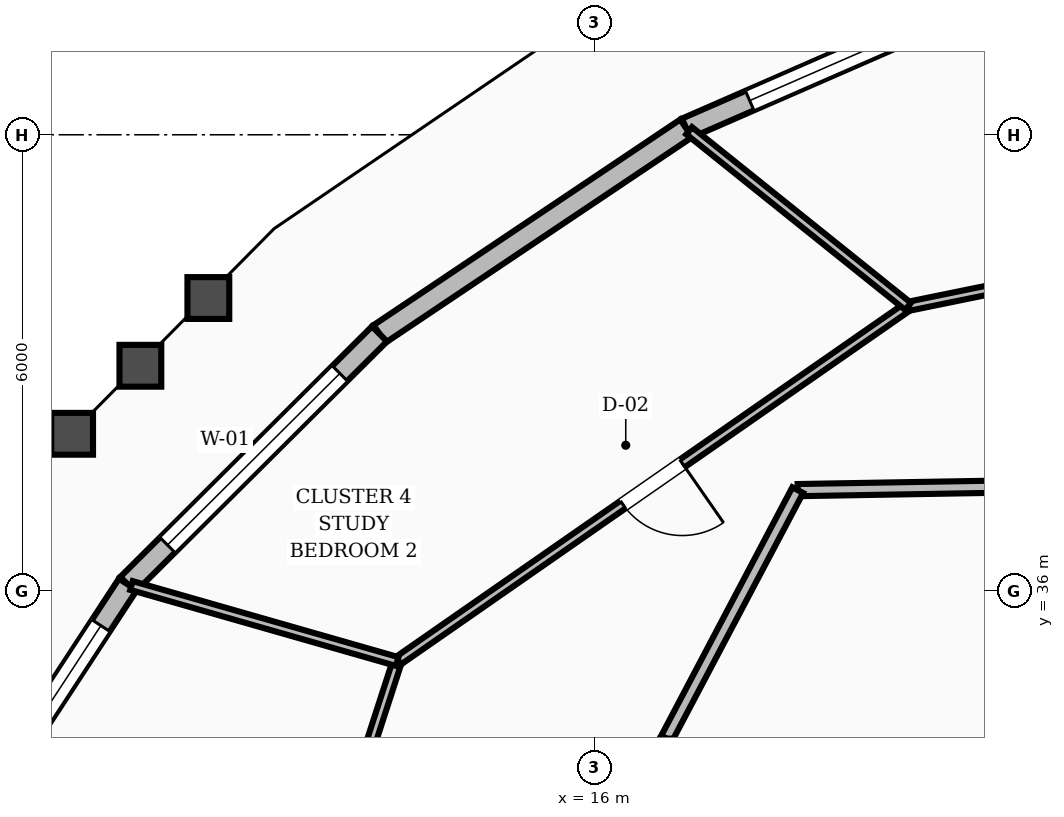
"""IFC4 building model, lengths in metres.
Left out: names, types, materials, properties, quantities, classifications, styles, units other than length and angle.
Written with IfcOpenShell. Run it as: python <this file> out.ifc"""

import sys

from ifc_helpers import new_model, si_unit, direction, frame, frame_2d, origin, place, context, subcontext, project, spatial, rectangle, extrude, element, fill, save


model = new_model("IFC4")
c1 = context("Model", 3, precision=1e-05, world=origin(), true_north=direction((0.0, 1.0)))
c2 = subcontext(c1, "Body", "Model", "MODEL_VIEW")
j1 = project(units=[si_unit("LENGTHUNIT", "METRE"), si_unit("PLANEANGLEUNIT", "RADIAN")], contexts=[c1])
p1 = place(None, origin())
s1 = spatial("IfcSite", under=j1, at=p1, CompositionType="ELEMENT")
p2 = place(p1, origin())
s2 = spatial("IfcBuilding", under=s1, at=p2, CompositionType="ELEMENT")
p3 = place(p2, frame((0.0, 0.0, 128.0)))
s3 = spatial("IfcBuildingStorey", under=s2, at=p3, CompositionType="ELEMENT", Elevation=128.0)
p4 = place(p3, frame((21.811, 44.094, 0.0), z_axis=(0.0, 0.0, 1.0), x_axis=(-0.916453831221, -0.400140444394, 0.0)))
e1 = element("IfcWall", 1, at=p4, inside=s3, PredefinedType="STANDARD", context=c2, shape_type="SweptSolid", body=[
    extrude(rectangle(XDim=5.023, YDim=0.28, at=frame_2d((2.511, 0.0))), origin(), (0.0, 0.0, 1.0), 2.82),
])
p5 = place(p4, frame((0.911, 0.0, 0.8)))
e2 = element("IfcOpeningElement", 2, at=p5, cuts=e1, PredefinedType="OPENING", context=c2, shape_type="SweptSolid", body=[
    extrude(rectangle(XDim=3.2, YDim=1.65, at=frame_2d((1.6, 0.825))), frame((0.0, 0.15, 0.0), z_axis=(0.0, -1.0, 0.0), x_axis=(1.0, 0.0, 0.0)), (0.0, 0.0, 1.0), 0.3),
])
p6 = place(p3, frame((17.208, 42.084, 0.0), z_axis=(0.0, 0.0, 1.0), x_axis=(-0.830609353865, -0.556855547941, 0.0)))
e3 = element("IfcWall", 3, at=p6, inside=s3, PredefinedType="STANDARD", context=c2, shape_type="SweptSolid", body=[
    extrude(rectangle(XDim=4.858, YDim=0.28, at=frame_2d((2.429, 0.0))), origin(), (0.0, 0.0, 1.0), 2.82),
])
p7 = place(p3, frame((13.173, 39.379, 0.0), z_axis=(0.0, 0.0, 1.0), x_axis=(-0.708724927863, -0.705484923032, 0.0)))
e4 = element("IfcWall", 4, at=p7, inside=s3, PredefinedType="STANDARD", context=c2, shape_type="SweptSolid", body=[
    extrude(rectangle(XDim=4.672, YDim=0.28, at=frame_2d((2.336, 0.0))), origin(), (0.0, 0.0, 1.0), 2.82),
])
p8 = place(p7, frame((0.736, 0.0, 0.8)))
e5 = element("IfcOpeningElement", 5, at=p8, cuts=e4, PredefinedType="OPENING", context=c2, shape_type="SweptSolid", body=[
    extrude(rectangle(XDim=3.2, YDim=1.65, at=frame_2d((1.6, 0.825))), frame((0.0, 0.15, 0.0), z_axis=(0.0, -1.0, 0.0), x_axis=(1.0, 0.0, 0.0)), (0.0, 0.0, 1.0), 0.3),
])
p9 = place(p3, frame((9.862, 36.083, 0.0), z_axis=(0.0, 0.0, 1.0), x_axis=(-0.547571349255, -0.836758996053, 0.0)))
e6 = element("IfcWall", 6, at=p9, inside=s3, PredefinedType="STANDARD", context=c2, shape_type="SweptSolid", body=[
    extrude(rectangle(XDim=4.494, YDim=0.28, at=frame_2d((2.247, 0.0))), origin(), (0.0, 0.0, 1.0), 2.82),
])
p10 = place(p9, frame((0.647, 0.0, 0.8)))
e7 = element("IfcOpeningElement", 7, at=p10, cuts=e6, PredefinedType="OPENING", context=c2, shape_type="SweptSolid", body=[
    extrude(rectangle(XDim=3.2, YDim=1.65, at=frame_2d((1.6, 0.825))), frame((0.0, 0.15, 0.0), z_axis=(0.0, -1.0, 0.0), x_axis=(1.0, 0.0, 0.0)), (0.0, 0.0, 1.0), 0.3),
])
p11 = place(p3, frame((23.046, 37.4, 0.0), z_axis=(0.0, 0.0, 1.0), x_axis=(-0.999853038912, -0.017143528788, 0.0)))
e8 = element("IfcWall", 8, at=p11, inside=s3, PredefinedType="SOLIDWALL", context=c2, shape_type="SweptSolid", body=[
    extrude(rectangle(XDim=4.372, YDim=0.16, at=frame_2d((2.186, 0.0))), origin(), (0.0, 0.0, 1.0), 2.8),
])
p12 = place(p3, frame((18.675, 37.325, 0.0), z_axis=(0.0, 0.0, 1.0), x_axis=(-0.466737093093, -0.884396113702, 0.0)))
e9 = element("IfcWall", 9, at=p12, inside=s3, PredefinedType="SOLIDWALL", context=c2, shape_type="SweptSolid", body=[
    extrude(rectangle(XDim=3.696, YDim=0.16, at=frame_2d((1.848, 0.0))), origin(), (0.0, 0.0, 1.0), 2.8),
])
p13 = place(p3, frame((28.07, 41.366, 0.0), z_axis=(0.0, 0.0, 1.0), x_axis=(-0.979737902763, -0.20028390322, 0.0)))
e10 = element("IfcWall", 10, at=p13, inside=s3, PredefinedType="PARTITIONING", context=c2, shape_type="SweptSolid", body=[
    extrude(rectangle(XDim=8.107, YDim=0.12, at=frame_2d((4.054, 0.0))), origin(), (0.0, 0.0, 1.0), 2.8),
])
p14 = place(p13, frame((4.96, 0.0, 0.0)))
e11 = element("IfcOpeningElement", 11, at=p14, cuts=e10, PredefinedType="OPENING", context=c2, shape_type="SweptSolid", body=[
    extrude(rectangle(XDim=0.95, YDim=2.1, at=frame_2d((0.475, 1.05))), frame((0.0, 0.07, 0.0), z_axis=(0.0, -1.0, 0.0), x_axis=(1.0, 0.0, 0.0)), (0.0, 0.0, 1.0), 0.14),
])
p15 = place(p3, frame((20.127, 39.742, 0.0), z_axis=(0.0, 0.0, 1.0), x_axis=(-0.821081459347, -0.570811034508, 0.0)))
e12 = element("IfcWall", 12, at=p15, inside=s3, PredefinedType="PARTITIONING", context=c2, shape_type="SweptSolid", body=[
    extrude(rectangle(XDim=8.186, YDim=0.12, at=frame_2d((4.093, 0.0))), origin(), (0.0, 0.0, 1.0), 2.8),
])
p16 = place(p15, frame((3.618, 0.0, 0.0)))
e13 = element("IfcOpeningElement", 13, at=p16, cuts=e12, PredefinedType="OPENING", context=c2, shape_type="SweptSolid", body=[
    extrude(rectangle(XDim=0.95, YDim=2.1, at=frame_2d((0.475, 1.05))), frame((0.0, 0.07, 0.0), z_axis=(0.0, -1.0, 0.0), x_axis=(1.0, 0.0, 0.0)), (0.0, 0.0, 1.0), 0.14),
])
p17 = place(p3, frame((20.127, 39.742, 0.0), z_axis=(0.0, 0.0, 1.0), x_axis=(-0.780010206727, 0.625766791547, 0.0)))
e14 = element("IfcWall", 14, at=p17, inside=s3, PredefinedType="PARTITIONING", context=c2, shape_type="SweptSolid", body=[
    extrude(rectangle(XDim=3.693, YDim=0.12, at=frame_2d((1.846, 0.0))), origin(), (0.0, 0.0, 1.0), 2.8),
])
p18 = place(p3, frame((13.406, 35.07, 0.0), z_axis=(0.0, 0.0, 1.0), x_axis=(-0.308702409374, -0.951158673643, 0.0)))
e15 = element("IfcWall", 15, at=p18, inside=s3, PredefinedType="PARTITIONING", context=c2, shape_type="SweptSolid", body=[
    extrude(rectangle(XDim=3.986, YDim=0.12, at=frame_2d((1.993, 0.0))), origin(), (0.0, 0.0, 1.0), 2.8),
])
p19 = place(p18, frame((1.518, 0.0, 0.0)))
e16 = element("IfcOpeningElement", 16, at=p19, cuts=e15, PredefinedType="OPENING", context=c2, shape_type="SweptSolid", body=[
    extrude(rectangle(XDim=0.95, YDim=2.1, at=frame_2d((0.475, 1.05))), frame((0.0, 0.07, 0.0), z_axis=(0.0, -1.0, 0.0), x_axis=(1.0, 0.0, 0.0)), (0.0, 0.0, 1.0), 0.14),
])
p20 = place(p3, frame((13.406, 35.07, 0.0), z_axis=(0.0, 0.0, 1.0), x_axis=(-0.961442831219, 0.275004876863, 0.0)))
e17 = element("IfcWall", 17, at=p20, inside=s3, PredefinedType="PARTITIONING", context=c2, shape_type="SweptSolid", body=[
    extrude(rectangle(XDim=3.636, YDim=0.12, at=frame_2d((1.818, 0.0))), origin(), (0.0, 0.0, 1.0), 2.8),
])
p21 = place(p5, origin())
e18 = element("IfcWindow", 18, at=p21, inside=s3, PartitioningType="SINGLE_PANEL", PredefinedType="WINDOW", context=c2, shape_type="SweptSolid", body=[
    extrude(rectangle(XDim=3.2, YDim=1.65, at=frame_2d((1.6, 0.825))), frame((0.0, 0.03, 0.0), z_axis=(0.0, -1.0, 0.0), x_axis=(1.0, 0.0, 0.0)), (0.0, 0.0, 1.0), 0.06),
])
fill(e2, e18)
p22 = place(p8, origin())
e19 = element("IfcWindow", 19, at=p22, inside=s3, PartitioningType="SINGLE_PANEL", PredefinedType="WINDOW", context=c2, shape_type="SweptSolid", body=[
    extrude(rectangle(XDim=3.2, YDim=1.65, at=frame_2d((1.6, 0.825))), frame((0.0, 0.03, 0.0), z_axis=(0.0, -1.0, 0.0), x_axis=(1.0, 0.0, 0.0)), (0.0, 0.0, 1.0), 0.06),
])
fill(e5, e19)
p23 = place(p10, origin())
e20 = element("IfcWindow", 20, at=p23, inside=s3, PartitioningType="SINGLE_PANEL", PredefinedType="WINDOW", context=c2, shape_type="SweptSolid", body=[
    extrude(rectangle(XDim=3.2, YDim=1.65, at=frame_2d((1.6, 0.825))), frame((0.0, 0.03, 0.0), z_axis=(0.0, -1.0, 0.0), x_axis=(1.0, 0.0, 0.0)), (0.0, 0.0, 1.0), 0.06),
])
fill(e7, e20)
p24 = place(p16, origin())
e21 = element("IfcDoor", 21, at=p24, inside=s3, OperationType="SINGLE_SWING_LEFT", PredefinedType="DOOR", context=c2, shape_type="SweptSolid", body=[
    extrude(rectangle(XDim=0.95, YDim=2.1, at=frame_2d((0.475, 1.05))), frame((0.0, 0.025, 0.0), z_axis=(0.0, -1.0, 0.0), x_axis=(1.0, 0.0, 0.0)), (0.0, 0.0, 1.0), 0.05),
])
fill(e13, e21)
save(model, sys.argv[1])
